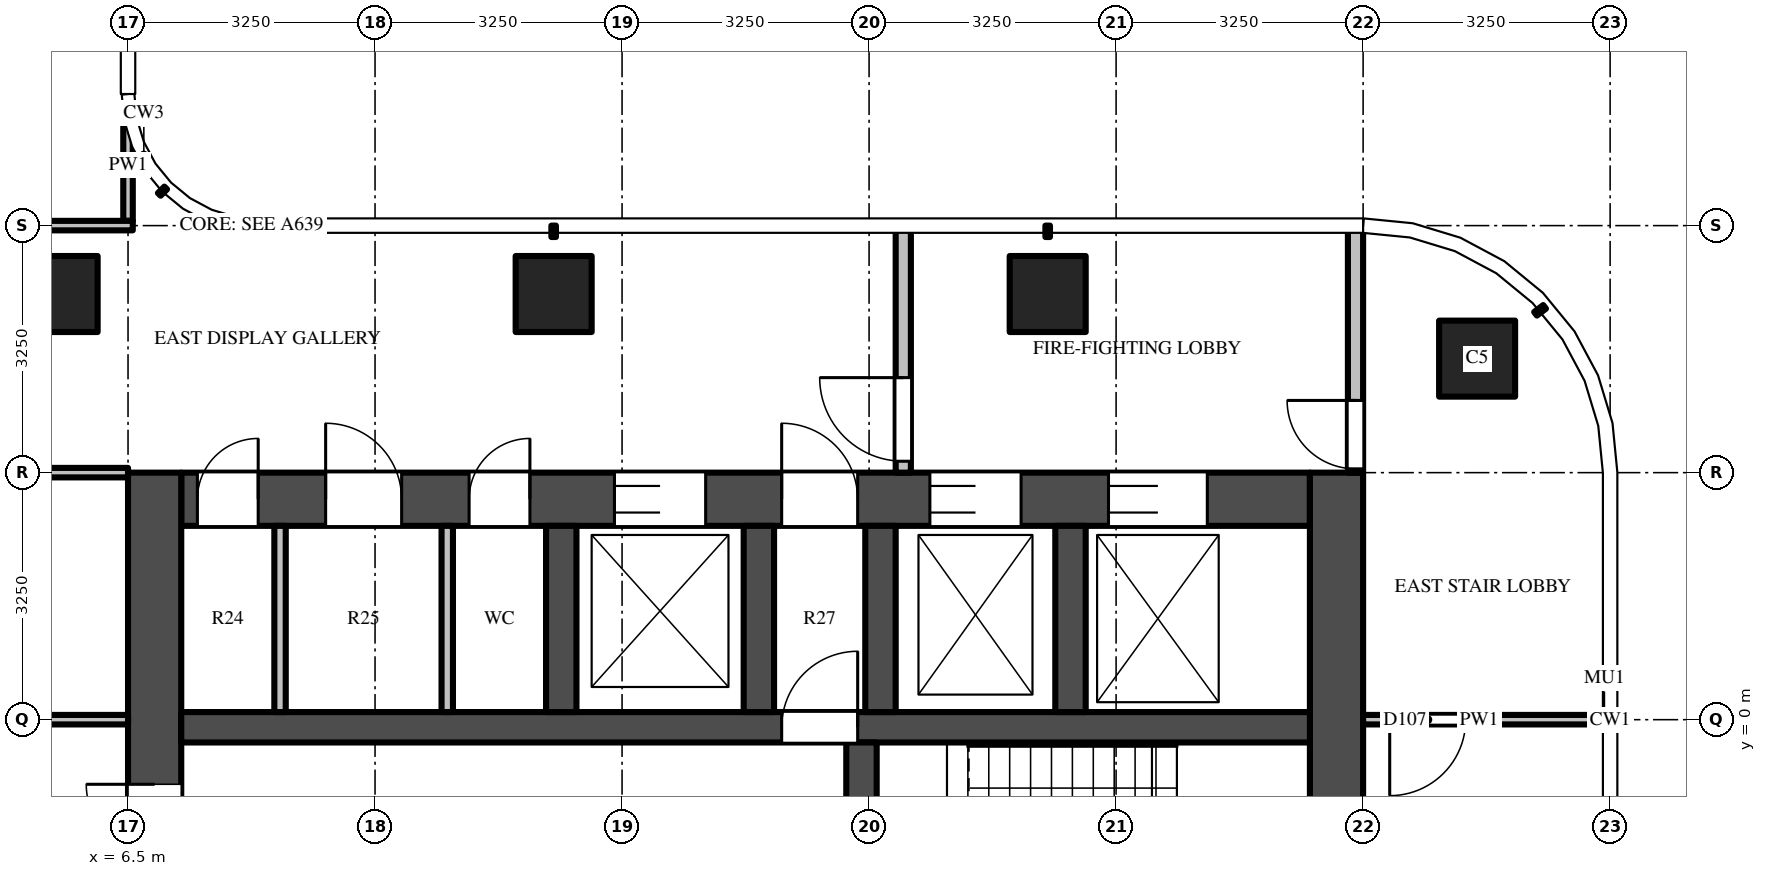
"""IFC4 building model, lengths in metres.
Left out: names, types, materials, properties, quantities, classifications, styles, units other than length and angle.
Written with IfcOpenShell. Run it as: python <this file> out.ifc"""

import sys

from ifc_helpers import new_model, si_unit, direction, frame, frame_2d, origin, origin_2d, place, context, subcontext, project, spatial, rectangle, extrude, source, transform, mapped, element, fill, save


model = new_model("IFC4")
c1 = context("Model", 3, precision=1e-05, world=origin(), true_north=direction((0.0, 1.0)))
c2 = subcontext(c1, "Body", "Model", "MODEL_VIEW")
j1 = project(units=[si_unit("LENGTHUNIT", "METRE"), si_unit("PLANEANGLEUNIT", "RADIAN")], contexts=[c1])
p1 = place(None, origin())
s1 = spatial("IfcSite", under=j1, at=p1, CompositionType="ELEMENT")
p2 = place(p1, origin())
s2 = spatial("IfcBuilding", under=s1, at=p2, CompositionType="ELEMENT")
p3 = place(p2, frame((0.0, 0.0, 298.9)))
s3 = spatial("IfcBuildingStorey", under=s2, at=p3, CompositionType="ELEMENT", Elevation=298.9)
m1 = source(origin(), c2, "Body", "SweptSolid", [
    extrude(rectangle(XDim=1.0, YDim=1.0, at=origin_2d()), origin(), (0.0, 0.0, 1.0), 3.9),
])
for number, where, z_axis, x_axis in (
    (1, (12.1, 5.6, 0.0), (0.0, 0.0, 1.0), (1.0, 0.0, 0.0)),
    (2, (18.6, 5.6, 0.0), (0.0, 0.0, 1.0), (1.0, 0.0, 0.0)),
    (3, (24.25, 4.75, 0.0), (0.0, 0.0, 1.0), (1.0, 0.0, 0.0)),
    (4, (5.6, 5.6, 0.0), (0.0, 0.0, 1.0), (1.0, 0.0, 0.0)),
):
    element("IfcColumn", number, at=place(p3, frame(where, z_axis=z_axis, x_axis=x_axis)), inside=s3, PredefinedType="COLUMN", context=c2, shape_type="MappedRepresentation", body=[
        mapped(m1, transform((0.0, 0.0, 0.0))),
    ])
m2 = source(origin(), c2, "Body", "SweptSolid", [
    extrude(rectangle(XDim=14.85, YDim=0.7, at=frame_2d((7.425, 0.0))), origin(), (0.0, 0.0, 1.0), 3.7),
])
p4 = place(p3, frame((7.2, 2.9, 0.0), z_axis=(0.0, 0.0, 1.0), x_axis=(1.0, 0.0, 0.0)))
e5 = element("IfcWall", 5, at=p4, inside=s3, PredefinedType="SHEAR", context=c2, shape_type="MappedRepresentation", body=[
    mapped(m2, transform((0.0, 0.0, 0.0))),
])
m3 = source(origin(), c2, "Body", "SweptSolid", [
    extrude(rectangle(XDim=1.2, YDim=2.1, at=frame_2d((0.6, 1.05))), frame((0.0, 0.36, 0.0), z_axis=(0.0, -1.0, 0.0), x_axis=(1.0, 0.0, 0.0)), (0.0, 0.0, 1.0), 0.72),
])
p5 = place(p4, frame((5.7, 0.0, 0.0)))
e6 = element("IfcOpeningElement", 6, at=p5, cuts=e5, PredefinedType="OPENING", context=c2, shape_type="MappedRepresentation", body=[
    mapped(m3, transform((0.0, 0.0, 0.0))),
])
m4 = source(origin(), c2, "Body", "SweptSolid", [
    extrude(rectangle(XDim=1.3, YDim=2.1, at=frame_2d((0.65, 1.05))), frame((0.0, 0.36, 0.0), z_axis=(0.0, -1.0, 0.0), x_axis=(1.0, 0.0, 0.0)), (0.0, 0.0, 1.0), 0.72),
])
p6 = place(p4, frame((12.2, 0.0, 0.0)))
e7 = element("IfcOpeningElement", 7, at=p6, cuts=e5, PredefinedType="OPENING", context=c2, shape_type="MappedRepresentation", body=[
    mapped(m4, transform((0.0, 0.0, 0.0))),
])
p7 = place(p4, frame((9.85, 0.0, 0.0)))
e8 = element("IfcOpeningElement", 8, at=p7, cuts=e5, PredefinedType="OPENING", context=c2, shape_type="MappedRepresentation", body=[
    mapped(m3, transform((0.0, 0.0, 0.0))),
])
m5 = source(origin(), c2, "Body", "SweptSolid", [
    extrude(rectangle(XDim=1.0, YDim=2.1, at=frame_2d((0.5, 1.05))), frame((0.0, 0.36, 0.0), z_axis=(0.0, -1.0, 0.0), x_axis=(1.0, 0.0, 0.0)), (0.0, 0.0, 1.0), 0.72),
])
p8 = place(p4, frame((7.9, 0.0, 0.0)))
e9 = element("IfcOpeningElement", 9, at=p8, cuts=e5, PredefinedType="OPENING", context=c2, shape_type="MappedRepresentation", body=[
    mapped(m5, transform((0.0, 0.0, 0.0))),
])
m6 = source(origin(), c2, "Body", "SweptSolid", [
    extrude(rectangle(XDim=0.8, YDim=2.1, at=frame_2d((0.4, 1.05))), frame((0.0, 0.36, 0.0), z_axis=(0.0, -1.0, 0.0), x_axis=(1.0, 0.0, 0.0)), (0.0, 0.0, 1.0), 0.72),
])
p9 = place(p4, frame((0.212, 0.0, 0.0)))
e10 = element("IfcOpeningElement", 10, at=p9, cuts=e5, PredefinedType="OPENING", context=c2, shape_type="MappedRepresentation", body=[
    mapped(m6, transform((0.0, 0.0, 0.0))),
])
p10 = place(p4, frame((1.9, 0.0, 0.0)))
e11 = element("IfcOpeningElement", 11, at=p10, cuts=e5, PredefinedType="OPENING", context=c2, shape_type="MappedRepresentation", body=[
    mapped(m5, transform((0.0, 0.0, 0.0))),
])
p11 = place(p4, frame((3.788, 0.0, 0.0)))
e12 = element("IfcOpeningElement", 12, at=p11, cuts=e5, PredefinedType="OPENING", context=c2, shape_type="MappedRepresentation", body=[
    mapped(m6, transform((0.0, 0.0, 0.0))),
])
m7 = source(origin(), c2, "Body", "SweptSolid", [
    extrude(rectangle(XDim=9.05, YDim=0.7, at=frame_2d((4.525, 0.0))), origin(), (0.0, 0.0, 1.0), 3.7),
])
p12 = place(p3, frame((6.85, -5.8, 0.0), z_axis=(0.0, 0.0, 1.0), x_axis=(0.0, 1.0, 0.0)))
e13 = element("IfcWall", 13, at=p12, inside=s3, PredefinedType="SHEAR", context=c2, shape_type="MappedRepresentation", body=[
    mapped(m7, transform((0.0, 0.0, 0.0))),
])
m8 = source(origin(), c2, "Body", "SweptSolid", [
    extrude(rectangle(XDim=1.8, YDim=2.1, at=frame_2d((0.9, 1.05))), frame((0.0, 0.36, 0.0), z_axis=(0.0, -1.0, 0.0), x_axis=(1.0, 0.0, 0.0)), (0.0, 0.0, 1.0), 0.72),
])
p13 = place(p12, frame((3.15, 0.0, 0.0)))
e14 = element("IfcOpeningElement", 14, at=p13, cuts=e13, PredefinedType="OPENING", context=c2, shape_type="MappedRepresentation", body=[
    mapped(m8, transform((0.0, 0.0, 0.0))),
])
p14 = place(p3, frame((22.4, -5.8, 0.0), z_axis=(0.0, 0.0, 1.0), x_axis=(0.0, 1.0, 0.0)))
e15 = element("IfcWall", 15, at=p14, inside=s3, PredefinedType="SHEAR", context=c2, shape_type="MappedRepresentation", body=[
    mapped(m7, transform((0.0, 0.0, 0.0))),
])
m9 = source(origin(), c2, "Body", "SweptSolid", [
    extrude(rectangle(XDim=14.85, YDim=0.4, at=frame_2d((7.425, 0.0))), origin(), (0.0, 0.0, 1.0), 3.7),
])
p15 = place(p3, frame((7.2, -0.1, 0.0), z_axis=(0.0, 0.0, 1.0), x_axis=(1.0, 0.0, 0.0)))
e16 = element("IfcWall", 16, at=p15, inside=s3, PredefinedType="SHEAR", context=c2, shape_type="MappedRepresentation", body=[
    mapped(m9, transform((0.0, 0.0, 0.0))),
])
m10 = source(origin(), c2, "Body", "SweptSolid", [
    extrude(rectangle(XDim=1.0, YDim=2.1, at=frame_2d((0.5, 1.05))), frame((0.0, 0.21, 0.0), z_axis=(0.0, -1.0, 0.0), x_axis=(1.0, 0.0, 0.0)), (0.0, 0.0, 1.0), 0.42),
])
p16 = place(p15, frame((7.9, 0.0, 0.0)))
e17 = element("IfcOpeningElement", 17, at=p16, cuts=e16, PredefinedType="OPENING", context=c2, shape_type="MappedRepresentation", body=[
    mapped(m10, transform((0.0, 0.0, 0.0))),
])
m11 = source(origin(), c2, "Body", "SweptSolid", [
    extrude(rectangle(XDim=5.5, YDim=0.4, at=frame_2d((2.75, 0.0))), origin(), (0.0, 0.0, 1.0), 3.7),
])
p17 = place(p3, frame((16.15, -5.8, 0.0), z_axis=(0.0, 0.0, 1.0), x_axis=(0.0, 1.0, 0.0)))
e18 = element("IfcWall", 18, at=p17, inside=s3, PredefinedType="SHEAR", context=c2, shape_type="MappedRepresentation", body=[
    mapped(m11, transform((0.0, 0.0, 0.0))),
])
m12 = source(origin(), c2, "Body", "SweptSolid", [
    extrude(rectangle(XDim=1.1, YDim=2.1, at=frame_2d((0.55, 1.05))), frame((0.0, 0.21, 0.0), z_axis=(0.0, -1.0, 0.0), x_axis=(1.0, 0.0, 0.0)), (0.0, 0.0, 1.0), 0.42),
])
p18 = place(p17, frame((0.725, 0.0, 0.0)))
e19 = element("IfcOpeningElement", 19, at=p18, cuts=e18, PredefinedType="OPENING", context=c2, shape_type="MappedRepresentation", body=[
    mapped(m12, transform((0.0, 0.0, 0.0))),
])
p19 = place(p17, frame((3.675, 0.0, 0.0)))
e20 = element("IfcOpeningElement", 20, at=p19, cuts=e18, PredefinedType="OPENING", context=c2, shape_type="MappedRepresentation", body=[
    mapped(m12, transform((0.0, 0.0, 0.0))),
])
m13 = source(origin(), c2, "Body", "SweptSolid", [
    extrude(rectangle(XDim=2.45, YDim=0.4, at=frame_2d((1.225, 0.0))), origin(), (0.0, 0.0, 1.0), 3.7),
])
for number, where, z_axis, x_axis in (
    (21, (12.2, 0.1, 0.0), (0.0, 0.0, 1.0), (0.0, 1.0, 0.0)),
    (22, (14.8, 0.1, 0.0), (0.0, 0.0, 1.0), (0.0, 1.0, 0.0)),
    (23, (16.4, 0.1, 0.0), (0.0, 0.0, 1.0), (0.0, 1.0, 0.0)),
    (24, (18.9, 0.1, 0.0), (0.0, 0.0, 1.0), (0.0, 1.0, 0.0)),
):
    element("IfcWall", number, at=place(p3, frame(where, z_axis=z_axis, x_axis=x_axis)), inside=s3, PredefinedType="SHEAR", context=c2, shape_type="MappedRepresentation", body=[
        mapped(m13, transform((0.0, 0.0, 0.0))),
    ])
m14 = source(origin(), c2, "Body", "SweptSolid", [
    extrude(rectangle(XDim=3.25, YDim=0.2, at=frame_2d((1.625, 0.0))), origin(), (0.0, 0.0, 1.0), 3.7),
])
p20 = place(p3, frame((16.7, 3.25, 0.0), z_axis=(0.0, 0.0, 1.0), x_axis=(0.0, 1.0, 0.0)))
e25 = element("IfcWall", 25, at=p20, inside=s3, PredefinedType="PARTITIONING", context=c2, shape_type="MappedRepresentation", body=[
    mapped(m14, transform((0.0, 0.0, 0.0))),
])
m15 = source(origin(), c2, "Body", "SweptSolid", [
    extrude(rectangle(XDim=1.1, YDim=2.1, at=frame_2d((0.55, 1.05))), frame((0.0, 0.11, 0.0), z_axis=(0.0, -1.0, 0.0), x_axis=(1.0, 0.0, 0.0)), (0.0, 0.0, 1.0), 0.22),
])
p21 = place(p20, frame((0.15, 0.0, 0.0)))
e26 = element("IfcOpeningElement", 26, at=p21, cuts=e25, PredefinedType="OPENING", context=c2, shape_type="MappedRepresentation", body=[
    mapped(m15, transform((0.0, 0.0, 0.0))),
])
p22 = place(p3, frame((22.65, 3.25, 0.0), z_axis=(0.0, 0.0, 1.0), x_axis=(0.0, 1.0, 0.0)))
e27 = element("IfcWall", 27, at=p22, inside=s3, PredefinedType="PARTITIONING", context=c2, shape_type="MappedRepresentation", body=[
    mapped(m14, transform((0.0, 0.0, 0.0))),
])
m16 = source(origin(), c2, "Body", "SweptSolid", [
    extrude(rectangle(XDim=0.9, YDim=2.1, at=frame_2d((0.45, 1.05))), frame((0.0, 0.11, 0.0), z_axis=(0.0, -1.0, 0.0), x_axis=(1.0, 0.0, 0.0)), (0.0, 0.0, 1.0), 0.22),
])
p23 = place(p22, frame((0.05, 0.0, 0.0)))
e28 = element("IfcOpeningElement", 28, at=p23, cuts=e27, PredefinedType="OPENING", context=c2, shape_type="MappedRepresentation", body=[
    mapped(m16, transform((0.0, 0.0, 0.0))),
])
m17 = source(origin(), c2, "Body", "SweptSolid", [
    extrude(rectangle(XDim=2.45, YDim=0.15, at=frame_2d((1.225, 0.0))), origin(), (0.0, 0.0, 1.0), 3.7),
])
for number, where, z_axis, x_axis in (
    (29, (8.5, 0.1, 0.0), (0.0, 0.0, 1.0), (0.0, 1.0, 0.0)),
    (30, (10.7, 0.1, 0.0), (0.0, 0.0, 1.0), (0.0, 1.0, 0.0)),
):
    element("IfcWall", number, at=place(p3, frame(where, z_axis=z_axis, x_axis=x_axis)), inside=s3, PredefinedType="PARTITIONING", context=c2, shape_type="MappedRepresentation", body=[
        mapped(m17, transform((0.0, 0.0, 0.0))),
    ])
m18 = source(origin(), c2, "Body", "SweptSolid", [
    extrude(rectangle(XDim=1.469, YDim=0.125, at=frame_2d((0.734, 0.0))), origin(), (0.0, 0.0, 1.0), 3.7),
])
p24 = place(p3, frame((6.5, 6.562, 0.0), z_axis=(0.0, 0.0, 1.0), x_axis=(0.0, 1.0, 0.0)))
e31 = element("IfcWall", 31, at=p24, inside=s3, PredefinedType="PARTITIONING", context=c2, shape_type="MappedRepresentation", body=[
    mapped(m18, transform((0.0, 0.0, 0.0))),
])
m19 = source(origin(), c2, "Body", "SweptSolid", [
    extrude(rectangle(XDim=5.363, YDim=0.125, at=frame_2d((2.681, 0.0))), origin(), (0.0, 0.0, 1.0), 2.997),
])
p25 = place(p3, frame((6.5, 0.0, 0.0), z_axis=(0.0, 0.0, 1.0), x_axis=(-1.0, 0.0, 0.0)))
e32 = element("IfcWall", 32, at=p25, inside=s3, PredefinedType="PARTITIONING", context=c2, shape_type="MappedRepresentation", body=[
    mapped(m19, transform((0.0, 0.0, 0.0))),
])
m20 = source(origin(), c2, "Body", "SweptSolid", [
    extrude(rectangle(XDim=1.0, YDim=2.1, at=frame_2d((0.5, 1.05))), frame((0.0, 0.073, 0.0), z_axis=(0.0, -1.0, 0.0), x_axis=(1.0, 0.0, 0.0)), (0.0, 0.0, 1.0), 0.145),
])
p26 = place(p25, frame((3.95, 0.0, 0.0)))
e33 = element("IfcOpeningElement", 33, at=p26, cuts=e32, PredefinedType="OPENING", context=c2, shape_type="MappedRepresentation", body=[
    mapped(m20, transform((0.0, 0.0, 0.0))),
])
m21 = source(origin(), c2, "Body", "SweptSolid", [
    extrude(rectangle(XDim=3.05, YDim=0.125, at=frame_2d((1.525, 0.0))), origin(), (0.0, 0.0, 1.0), 2.78),
])
p27 = place(p3, frame((25.8, 0.0, 0.0), z_axis=(0.0, 0.0, 1.0), x_axis=(-1.0, 0.0, 0.0)))
e34 = element("IfcWall", 34, at=p27, inside=s3, PredefinedType="PARTITIONING", context=c2, shape_type="MappedRepresentation", body=[
    mapped(m21, transform((0.0, 0.0, 0.0))),
])
p28 = place(p27, frame((1.7, 0.0, 0.0)))
e35 = element("IfcOpeningElement", 35, at=p28, cuts=e34, PredefinedType="OPENING", context=c2, shape_type="MappedRepresentation", body=[
    mapped(m20, transform((0.0, 0.0, 0.0))),
])
p29 = place(p3, frame((1.137, 3.25, 0.0), z_axis=(0.0, 0.0, 1.0), x_axis=(1.0, 0.0, 0.0)))
e36 = element("IfcWall", 36, at=p29, inside=s3, PredefinedType="PARTITIONING", context=c2, shape_type="MappedRepresentation", body=[
    mapped(m19, transform((0.0, 0.0, 0.0))),
])
m22 = source(origin(), c2, "Body", "SweptSolid", [
    extrude(rectangle(XDim=5.425, YDim=0.125, at=frame_2d((2.712, 0.0))), origin(), (0.0, 0.0, 1.0), 2.78),
])
p30 = place(p3, frame((1.137, 6.5, 0.0), z_axis=(0.0, 0.0, 1.0), x_axis=(1.0, 0.0, 0.0)))
e37 = element("IfcWall", 37, at=p30, inside=s3, PredefinedType="PARTITIONING", context=c2, shape_type="MappedRepresentation", body=[
    mapped(m22, transform((0.0, 0.0, 0.0))),
])
m23 = source(origin(), c2, "Body", "SweptSolid", [
    extrude(rectangle(XDim=1.2, YDim=2.1, at=frame_2d((0.6, 1.05))), frame((0.0, -0.275, 0.0), z_axis=(0.0, -1.0, 0.0), x_axis=(1.0, 0.0, 0.0)), (0.0, 0.0, 1.0), 0.05),
])
p31 = place(p5, origin())
e38 = element("IfcDoor", 38, at=p31, inside=s3, OperationType="DOUBLE_DOOR_SLIDING", PredefinedType="DOOR", context=c2, shape_type="MappedRepresentation", body=[
    mapped(m23, transform((0.0, 0.0, 0.0))),
])
fill(e6, e38)
m24 = source(origin(), c2, "Body", "SweptSolid", [
    extrude(rectangle(XDim=1.3, YDim=2.1, at=frame_2d((0.65, 1.05))), frame((0.0, -0.275, 0.0), z_axis=(0.0, -1.0, 0.0), x_axis=(1.0, 0.0, 0.0)), (0.0, 0.0, 1.0), 0.05),
])
p32 = place(p6, origin())
e39 = element("IfcDoor", 39, at=p32, inside=s3, OperationType="DOUBLE_DOOR_SLIDING", PredefinedType="DOOR", context=c2, shape_type="MappedRepresentation", body=[
    mapped(m24, transform((0.0, 0.0, 0.0))),
])
fill(e7, e39)
p33 = place(p7, origin())
e40 = element("IfcDoor", 40, at=p33, inside=s3, OperationType="DOUBLE_DOOR_SLIDING", PredefinedType="DOOR", context=c2, shape_type="MappedRepresentation", body=[
    mapped(m23, transform((0.0, 0.0, 0.0))),
])
fill(e8, e40)
m25 = source(origin(), c2, "Body", "SweptSolid", [
    extrude(rectangle(XDim=1.8, YDim=2.1, at=frame_2d((0.9, 1.05))), frame((0.0, -0.275, 0.0), z_axis=(0.0, -1.0, 0.0), x_axis=(1.0, 0.0, 0.0)), (0.0, 0.0, 1.0), 0.05),
])
p34 = place(p13, origin())
e41 = element("IfcDoor", 41, at=p34, inside=s3, OperationType="DOUBLE_DOOR_SINGLE_SWING", PredefinedType="DOOR", context=c2, shape_type="MappedRepresentation", body=[
    mapped(m25, transform((0.0, 0.0, 0.0))),
])
fill(e14, e41)
m26 = source(origin(), c2, "Body", "SweptSolid", [
    extrude(rectangle(XDim=1.0, YDim=2.1, at=frame_2d((0.5, 1.05))), frame((0.0, 0.025, 0.0), z_axis=(0.0, -1.0, 0.0), x_axis=(1.0, 0.0, 0.0)), (0.0, 0.0, 1.0), 0.05),
])
p35 = place(p16, origin())
e42 = element("IfcDoor", 42, at=p35, inside=s3, OperationType="SINGLE_SWING_RIGHT", PredefinedType="DOOR", context=c2, shape_type="MappedRepresentation", body=[
    mapped(m26, transform((0.0, 0.0, 0.0))),
])
fill(e17, e42)
m27 = source(origin(), c2, "Body", "SweptSolid", [
    extrude(rectangle(XDim=1.0, YDim=2.1, at=frame_2d((0.5, 1.05))), frame((0.0, -0.275, 0.0), z_axis=(0.0, -1.0, 0.0), x_axis=(1.0, 0.0, 0.0)), (0.0, 0.0, 1.0), 0.05),
])
p36 = place(p8, origin())
e43 = element("IfcDoor", 43, at=p36, inside=s3, OperationType="SINGLE_SWING_LEFT", PredefinedType="DOOR", context=c2, shape_type="MappedRepresentation", body=[
    mapped(m27, transform((0.0, 0.0, 0.0))),
])
fill(e9, e43)
m28 = source(origin(), c2, "Body", "SweptSolid", [
    extrude(rectangle(XDim=1.1, YDim=2.1, at=frame_2d((0.55, 1.05))), frame((0.0, 0.025, 0.0), z_axis=(0.0, -1.0, 0.0), x_axis=(1.0, 0.0, 0.0)), (0.0, 0.0, 1.0), 0.05),
])
p37 = place(p21, origin())
e44 = element("IfcDoor", 44, at=p37, inside=s3, OperationType="SINGLE_SWING_RIGHT", PredefinedType="DOOR", context=c2, shape_type="MappedRepresentation", body=[
    mapped(m28, transform((0.0, 0.0, 0.0))),
])
fill(e26, e44)
m29 = source(origin(), c2, "Body", "SweptSolid", [
    extrude(rectangle(XDim=0.9, YDim=2.1, at=frame_2d((0.45, 1.05))), frame((0.0, 0.025, 0.0), z_axis=(0.0, -1.0, 0.0), x_axis=(1.0, 0.0, 0.0)), (0.0, 0.0, 1.0), 0.05),
])
p38 = place(p23, origin())
e45 = element("IfcDoor", 45, at=p38, inside=s3, OperationType="SINGLE_SWING_RIGHT", PredefinedType="DOOR", context=c2, shape_type="MappedRepresentation", body=[
    mapped(m29, transform((0.0, 0.0, 0.0))),
])
fill(e28, e45)
m30 = source(origin(), c2, "Body", "SweptSolid", [
    extrude(rectangle(XDim=0.8, YDim=2.1, at=frame_2d((0.4, 1.05))), frame((0.0, -0.275, 0.0), z_axis=(0.0, -1.0, 0.0), x_axis=(1.0, 0.0, 0.0)), (0.0, 0.0, 1.0), 0.05),
])
p39 = place(p9, origin())
e46 = element("IfcDoor", 46, at=p39, inside=s3, OperationType="SINGLE_SWING_RIGHT", PredefinedType="DOOR", context=c2, shape_type="MappedRepresentation", body=[
    mapped(m30, transform((0.0, 0.0, 0.0))),
])
fill(e10, e46)
p40 = place(p10, origin())
e47 = element("IfcDoor", 47, at=p40, inside=s3, OperationType="SINGLE_SWING_LEFT", PredefinedType="DOOR", context=c2, shape_type="MappedRepresentation", body=[
    mapped(m27, transform((0.0, 0.0, 0.0))),
])
fill(e11, e47)
p41 = place(p11, origin())
e48 = element("IfcDoor", 48, at=p41, inside=s3, OperationType="SINGLE_SWING_RIGHT", PredefinedType="DOOR", context=c2, shape_type="MappedRepresentation", body=[
    mapped(m30, transform((0.0, 0.0, 0.0))),
])
fill(e12, e48)
p42 = place(p28, origin())
e49 = element("IfcDoor", 49, at=p42, inside=s3, OperationType="SINGLE_SWING_RIGHT", PredefinedType="DOOR", context=c2, shape_type="MappedRepresentation", body=[
    mapped(m26, transform((0.0, 0.0, 0.0))),
])
fill(e35, e49)
save(model, sys.argv[1])
